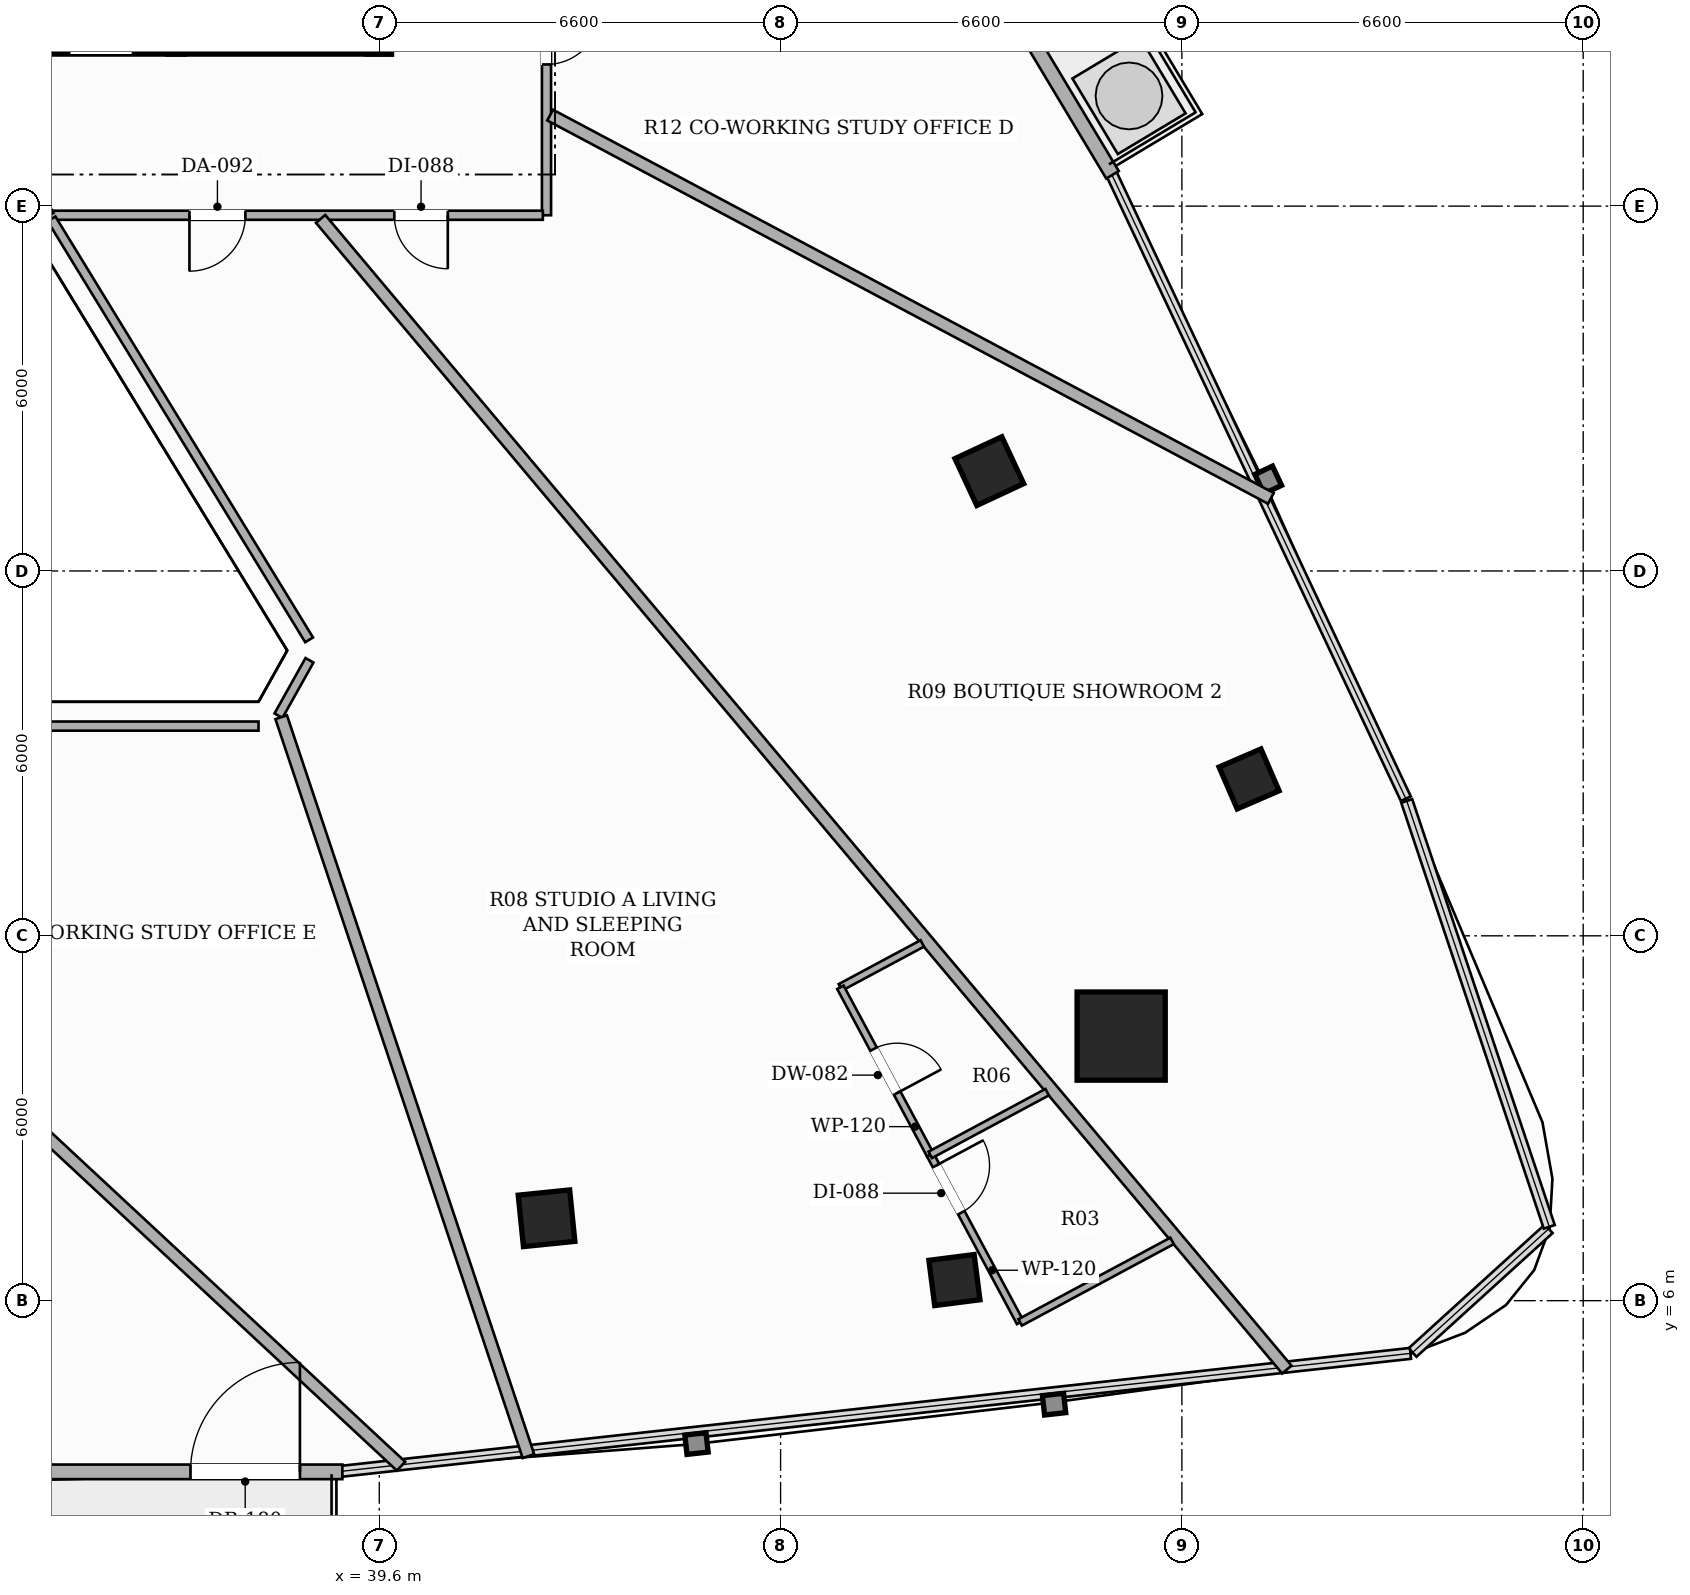
"""IFC4 building model, lengths in metres.
Left out: names, types, materials, properties, quantities, classifications, styles, units other than length and angle.
Written with IfcOpenShell. Run it as: python <this file> out.ifc"""

import sys

from ifc_helpers import new_model, si_unit, direction, frame, frame_2d, origin, origin_2d, place, context, subcontext, project, spatial, rectangle, hollow_rectangle, extrude, element, fill, save


model = new_model("IFC4")
c1 = context("Model", 3, precision=1e-05, world=origin(), true_north=direction((0.0, 1.0)))
c2 = subcontext(c1, "Body", "Model", "MODEL_VIEW")
j1 = project(units=[si_unit("LENGTHUNIT", "METRE"), si_unit("PLANEANGLEUNIT", "RADIAN")], contexts=[c1])
p1 = place(None, origin())
s1 = spatial("IfcSite", under=j1, at=p1, CompositionType="ELEMENT")
p2 = place(p1, origin())
s2 = spatial("IfcBuilding", under=s1, at=p2, CompositionType="ELEMENT")
p3 = place(p2, frame((0.0, 0.0, 133.1)))
s3 = spatial("IfcBuildingStorey", under=s2, at=p3, CompositionType="ELEMENT", Elevation=133.1)
p4 = place(p3, frame((26.2, 26.7, 0.0), z_axis=(0.0, 0.0, 1.0), x_axis=(1.0, 0.0, 0.0)))
e1 = element("IfcWall", 1, at=p4, inside=s3, PredefinedType="SHEAR", context=c2, shape_type="SweptSolid", body=[
    extrude(rectangle(XDim=13.6, YDim=0.4, at=frame_2d((6.8, 0.0))), origin(), (0.0, 0.0, 1.0), 3.3),
])
p5 = place(p4, frame((4.35, 0.0, 0.0)))
e2 = element("IfcOpeningElement", 2, at=p5, cuts=e1, PredefinedType="OPENING", context=c2, shape_type="SweptSolid", body=[
    extrude(rectangle(XDim=1.05, YDim=2.15, at=frame_2d((0.525, 1.075))), frame((0.0, 0.21, 0.0), z_axis=(0.0, -1.0, 0.0), x_axis=(1.0, 0.0, 0.0)), (0.0, 0.0, 1.0), 0.42),
])
p6 = place(p4, frame((8.3, 0.0, 0.0)))
e3 = element("IfcOpeningElement", 3, at=p6, cuts=e1, PredefinedType="OPENING", context=c2, shape_type="SweptSolid", body=[
    extrude(rectangle(XDim=1.05, YDim=2.15, at=frame_2d((0.525, 1.075))), frame((0.0, 0.21, 0.0), z_axis=(0.0, -1.0, 0.0), x_axis=(1.0, 0.0, 0.0)), (0.0, 0.0, 1.0), 0.42),
])
p7 = place(p3, frame((39.6, 26.5, 0.0), z_axis=(0.0, 0.0, 1.0), x_axis=(0.0, 1.0, 0.0)))
e4 = element("IfcWall", 4, at=p7, inside=s3, PredefinedType="SHEAR", context=c2, shape_type="SweptSolid", body=[
    extrude(rectangle(XDim=7.6, YDim=0.4, at=frame_2d((3.8, 0.0))), origin(), (0.0, 0.0, 1.0), 3.3),
])
p8 = place(p3, frame((36.26, 26.5, 0.0), z_axis=(0.0, 0.0, 1.0), x_axis=(0.0, 1.0, 0.0)))
e5 = element("IfcWall", 5, at=p8, inside=s3, PredefinedType="SHEAR", context=c2, shape_type="SweptSolid", body=[
    extrude(rectangle(XDim=8.15, YDim=0.28, at=frame_2d((4.075, 0.0))), origin(), (0.0, 0.0, 1.0), 3.3),
])
p9 = place(p8, frame((0.6, 0.0, 0.0)))
e6 = element("IfcOpeningElement", 6, at=p9, cuts=e5, PredefinedType="OPENING", context=c2, shape_type="SweptSolid", body=[
    extrude(rectangle(XDim=1.05, YDim=2.15, at=frame_2d((0.525, 1.075))), frame((0.0, 0.15, 0.0), z_axis=(0.0, -1.0, 0.0), x_axis=(1.0, 0.0, 0.0)), (0.0, 0.0, 1.0), 0.3),
])
p10 = place(p3, frame((51.801, 10.351, 0.0), z_axis=(0.0, 0.0, 1.0), x_axis=(1.0, 0.0, 0.0)))
e7 = element("IfcColumn", 7, at=p10, inside=s3, PredefinedType="COLUMN", context=c2, shape_type="SweptSolid", body=[
    extrude(hollow_rectangle(XDim=1.45, YDim=1.45, WallThickness=0.045, at=origin_2d()), origin(), (0.0, 0.0, 1.0), 3.3),
])
for number, where, z_axis, x_axis in (
    (8, (42.351, 7.355, 0.0), (0.0, 0.0, 1.0), (0.995, 0.101, 0.0)),
    (9, (49.633, 19.642, 0.0), (0.0, 0.0, 1.0), (-0.423, 0.906, 0.0)),
):
    element("IfcColumn", number, at=place(p3, frame(where, z_axis=z_axis, x_axis=x_axis)), inside=s3, PredefinedType="COLUMN", context=c2, shape_type="SweptSolid", body=[
        extrude(hollow_rectangle(XDim=0.85, YDim=0.85, WallThickness=0.028, at=origin_2d()), origin(), (0.0, 0.0, 1.0), 3.3),
    ])
for number, where, z_axis, x_axis in (
    (10, (49.059, 6.339, 0.0), (0.0, 0.0, 1.0), (0.992, 0.127, 0.0)),
    (11, (53.905, 14.58, 0.0), (0.0, 0.0, 1.0), (-0.397, 0.918, 0.0)),
):
    element("IfcColumn", number, at=place(p3, frame(where, z_axis=z_axis, x_axis=x_axis)), inside=s3, PredefinedType="COLUMN", context=c2, shape_type="SweptSolid", body=[
        extrude(hollow_rectangle(XDim=0.75, YDim=0.75, WallThickness=0.025, at=origin_2d()), origin(), (0.0, 0.0, 1.0), 3.3),
    ])
p11 = place(p3, frame((27.007, 3.185, 0.0), z_axis=(0.0, 0.0, 1.0), x_axis=(1.0, 0.0, 0.0)))
e12 = element("IfcWall", 12, at=p11, inside=s3, PredefinedType="SOLIDWALL", context=c2, shape_type="SweptSolid", body=[
    extrude(rectangle(XDim=11.986, YDim=0.24, at=frame_2d((5.993, 0.0))), origin(), (0.0, 0.0, 1.0), 2.624),
])
p12 = place(p11, frame((9.488, 0.0, 0.0)))
e13 = element("IfcOpeningElement", 13, at=p12, cuts=e12, PredefinedType="OPENING", context=c2, shape_type="SweptSolid", body=[
    extrude(rectangle(XDim=1.8, YDim=2.2, at=frame_2d((0.9, 1.1))), frame((0.0, 0.13, 0.0), z_axis=(0.0, -1.0, 0.0), x_axis=(1.0, 0.0, 0.0)), (0.0, 0.0, 1.0), 0.26),
])
p13 = place(p3, frame((51.659, 24.515, 0.0), z_axis=(0.0, 0.0, 1.0), x_axis=(-0.514343998995, 0.857583961311, 0.0)))
e14 = element("IfcWall", 14, at=p13, inside=s3, PredefinedType="SOLIDWALL", context=c2, shape_type="SweptSolid", body=[
    extrude(rectangle(XDim=11.593, YDim=0.24, at=frame_2d((5.797, 0.0))), origin(), (0.0, 0.0, 1.0), 2.624),
])
p14 = place(p13, frame((9.096, 0.0, 0.0)))
e15 = element("IfcOpeningElement", 15, at=p14, cuts=e14, PredefinedType="OPENING", context=c2, shape_type="SweptSolid", body=[
    extrude(rectangle(XDim=1.8, YDim=2.2, at=frame_2d((0.9, 1.1))), frame((0.0, 0.13, 0.0), z_axis=(0.0, -1.0, 0.0), x_axis=(1.0, 0.0, 0.0)), (0.0, 0.0, 1.0), 0.26),
])
p15 = place(p3, frame((42.35, 28.34, 0.0), z_axis=(0.0, 0.0, 1.0), x_axis=(0.0, -1.0, 0.0)))
e16 = element("IfcWall", 16, at=p15, inside=s3, PredefinedType="PARTITIONING", context=c2, shape_type="SweptSolid", body=[
    extrude(rectangle(XDim=4.49, YDim=0.15, at=frame_2d((2.245, 0.0))), origin(), (0.0, 0.0, 1.0), 2.721),
])
p16 = place(p15, frame((1.13, 0.0, 0.0)))
e17 = element("IfcOpeningElement", 17, at=p16, cuts=e16, PredefinedType="OPENING", context=c2, shape_type="SweptSolid", body=[
    extrude(rectangle(XDim=0.88, YDim=2.1, at=frame_2d((0.44, 1.05))), frame((0.0, 0.085, 0.0), z_axis=(0.0, -1.0, 0.0), x_axis=(1.0, 0.0, 0.0)), (0.0, 0.0, 1.0), 0.17),
])
p17 = place(p3, frame((42.29, 23.85, 0.0), z_axis=(0.0, 0.0, 1.0), x_axis=(-1.0, 0.0, 0.0)))
e18 = element("IfcWall", 18, at=p17, inside=s3, PredefinedType="PARTITIONING", context=c2, shape_type="SweptSolid", body=[
    extrude(rectangle(XDim=8.111, YDim=0.15, at=frame_2d((4.056, 0.0))), origin(), (0.0, 0.0, 1.0), 2.492),
])
p18 = place(p17, frame((1.563, 0.0, 0.0)))
e19 = element("IfcOpeningElement", 19, at=p18, cuts=e18, PredefinedType="OPENING", context=c2, shape_type="SweptSolid", body=[
    extrude(rectangle(XDim=0.88, YDim=2.1, at=frame_2d((0.44, 1.05))), frame((0.0, 0.085, 0.0), z_axis=(0.0, -1.0, 0.0), x_axis=(1.0, 0.0, 0.0)), (0.0, 0.0, 1.0), 0.17),
])
p19 = place(p17, frame((4.892, 0.0, 0.0)))
e20 = element("IfcOpeningElement", 20, at=p19, cuts=e18, PredefinedType="OPENING", context=c2, shape_type="SweptSolid", body=[
    extrude(rectangle(XDim=0.92, YDim=2.15, at=frame_2d((0.46, 1.075))), frame((0.0, 0.085, 0.0), z_axis=(0.0, -1.0, 0.0), x_axis=(1.0, 0.0, 0.0)), (0.0, 0.0, 1.0), 0.17),
])
p20 = place(p3, frame((34.179, 23.85, 0.0), z_axis=(0.0, 0.0, 1.0), x_axis=(-0.527828834635, 0.849350764601, 0.0)))
e21 = element("IfcWall", 21, at=p20, inside=s3, PredefinedType="PARTITIONING", context=c2, shape_type="SweptSolid", body=[
    extrude(rectangle(XDim=0.678, YDim=0.15, at=frame_2d((0.339, 0.0))), origin(), (0.0, 0.0, 1.0), 3.06),
])
p21 = place(p3, frame((34.21, 23.79, 0.0), z_axis=(0.0, 0.0, 1.0), x_axis=(0.521925672495, -0.852990968528, 0.0)))
e22 = element("IfcWall", 22, at=p21, inside=s3, PredefinedType="PARTITIONING", context=c2, shape_type="SweptSolid", body=[
    extrude(rectangle(XDim=8.116, YDim=0.15, at=frame_2d((4.058, 0.0))), origin(), (0.0, 0.0, 1.0), 2.721),
])
p22 = place(p3, frame((38.452, 16.531, 0.0), z_axis=(0.0, 0.0, 1.0), x_axis=(-0.488539276118, -0.872541904833, 0.0)))
e23 = element("IfcWall", 23, at=p22, inside=s3, PredefinedType="PARTITIONING", context=c2, shape_type="SweptSolid", body=[
    extrude(rectangle(XDim=1.044, YDim=0.15, at=frame_2d((0.522, 0.0))), origin(), (0.0, 0.0, 1.0), 3.06),
])
p23 = place(p3, frame((37.614, 15.449, 0.0), z_axis=(0.0, 0.0, 1.0), x_axis=(-1.0, 0.0, 0.0)))
e24 = element("IfcWall", 24, at=p23, inside=s3, PredefinedType="PARTITIONING", context=c2, shape_type="SweptSolid", body=[
    extrude(rectangle(XDim=9.228, YDim=0.15, at=frame_2d((4.614, 0.0))), origin(), (0.0, 0.0, 1.0), 2.721),
])
p24 = place(p3, frame((54.526, 4.867, 0.0), z_axis=(0.0, 0.0, 1.0), x_axis=(-0.643084567011, 0.765795168222, 0.0)))
e25 = element("IfcWall", 25, at=p24, inside=s3, PredefinedType="PARTITIONING", context=c2, shape_type="SweptSolid", body=[
    extrude(rectangle(XDim=24.71, YDim=0.2, at=frame_2d((12.355, 0.0))), origin(), (0.0, 0.0, 1.0), 2.413),
])
p25 = place(p3, frame((42.41, 25.497, 0.0), z_axis=(0.0, 0.0, 1.0), x_axis=(0.882944726502, -0.46947695358, 0.0)))
e26 = element("IfcWall", 26, at=p25, inside=s3, PredefinedType="PARTITIONING", context=c2, shape_type="SweptSolid", body=[
    extrude(rectangle(XDim=13.426, YDim=0.2, at=frame_2d((6.713, 0.0))), origin(), (0.0, 0.0, 1.0), 2.413),
])
p26 = place(p3, frame((42.053, 3.444, 0.0), z_axis=(0.0, 0.0, 1.0), x_axis=(-0.317325063931, 0.948316826699, 0.0)))
e27 = element("IfcWall", 27, at=p26, inside=s3, PredefinedType="PARTITIONING", context=c2, shape_type="SweptSolid", body=[
    extrude(rectangle(XDim=12.813, YDim=0.2, at=frame_2d((6.406, 0.0))), origin(), (0.0, 0.0, 1.0), 2.413),
])
p27 = place(p3, frame((39.958, 3.278, 0.0), z_axis=(0.0, 0.0, 1.0), x_axis=(-0.732155976475, 0.681137009795, 0.0)))
e28 = element("IfcWall", 28, at=p27, inside=s3, PredefinedType="PARTITIONING", context=c2, shape_type="SweptSolid", body=[
    extrude(rectangle(XDim=18.778, YDim=0.2, at=frame_2d((9.389, 0.0))), origin(), (0.0, 0.0, 1.0), 2.413),
])
p28 = place(p3, frame((48.53, 11.875, 0.0), z_axis=(0.0, 0.0, 1.0), x_axis=(-0.881239847135, -0.472669368398, 0.0)))
e29 = element("IfcWall", 29, at=p28, inside=s3, PredefinedType="PARTITIONING", context=c2, shape_type="SweptSolid", body=[
    extrude(rectangle(XDim=1.527, YDim=0.12, at=frame_2d((0.764, 0.0))), origin(), (0.0, 0.0, 1.0), 3.06),
])
p29 = place(p3, frame((47.184, 11.153, 0.0), z_axis=(0.0, 0.0, 1.0), x_axis=(0.472734891499, -0.881204699465, 0.0)))
e30 = element("IfcWall", 30, at=p29, inside=s3, PredefinedType="PARTITIONING", context=c2, shape_type="SweptSolid", body=[
    extrude(rectangle(XDim=3.126, YDim=0.12, at=frame_2d((1.563, 0.0))), origin(), (0.0, 0.0, 1.0), 2.721),
])
p30 = place(p29, frame((1.153, 0.0, 0.0)))
e31 = element("IfcOpeningElement", 31, at=p30, cuts=e30, PredefinedType="OPENING", context=c2, shape_type="SweptSolid", body=[
    extrude(rectangle(XDim=0.82, YDim=2.1, at=frame_2d((0.41, 1.05))), frame((0.0, 0.07, 0.0), z_axis=(0.0, -1.0, 0.0), x_axis=(1.0, 0.0, 0.0)), (0.0, 0.0, 1.0), 0.14),
])
p31 = place(p3, frame((48.662, 8.398, 0.0), z_axis=(0.0, 0.0, 1.0), x_axis=(0.472706781447, -0.881219778928, 0.0)))
e32 = element("IfcWall", 32, at=p31, inside=s3, PredefinedType="PARTITIONING", context=c2, shape_type="SweptSolid", body=[
    extrude(rectangle(XDim=3.126, YDim=0.12, at=frame_2d((1.563, 0.0))), origin(), (0.0, 0.0, 1.0), 2.413),
])
p32 = place(p31, frame((0.2, 0.0, 0.0)))
e33 = element("IfcOpeningElement", 33, at=p32, cuts=e32, PredefinedType="OPENING", context=c2, shape_type="SweptSolid", body=[
    extrude(rectangle(XDim=0.88, YDim=2.1, at=frame_2d((0.44, 1.05))), frame((0.0, 0.07, 0.0), z_axis=(0.0, -1.0, 0.0), x_axis=(1.0, 0.0, 0.0)), (0.0, 0.0, 1.0), 0.14),
])
p33 = place(p3, frame((50.14, 5.643, 0.0), z_axis=(0.0, 0.0, 1.0), x_axis=(0.881244272045, 0.472661118548, 0.0)))
e34 = element("IfcWall", 34, at=p33, inside=s3, PredefinedType="PARTITIONING", context=c2, shape_type="SweptSolid", body=[
    extrude(rectangle(XDim=2.835, YDim=0.12, at=frame_2d((1.417, 0.0))), origin(), (0.0, 0.0, 1.0), 2.619),
])
p34 = place(p3, frame((50.584, 9.429, 0.0), z_axis=(0.0, 0.0, 1.0), x_axis=(-0.88120690194, -0.472730785937, 0.0)))
e35 = element("IfcWall", 35, at=p34, inside=s3, PredefinedType="PARTITIONING", context=c2, shape_type="SweptSolid", body=[
    extrude(rectangle(XDim=2.181, YDim=0.12, at=frame_2d((1.09, 0.0))), origin(), (0.0, 0.0, 1.0), 3.06),
])
p35 = place(p12, origin())
e36 = element("IfcDoor", 36, at=p35, inside=s3, OperationType="SINGLE_SWING_RIGHT", PredefinedType="DOOR", context=c2, shape_type="SweptSolid", body=[
    extrude(rectangle(XDim=1.8, YDim=2.2, at=frame_2d((0.9, 1.1))), frame((0.0, 0.025, 0.0), z_axis=(0.0, -1.0, 0.0), x_axis=(1.0, 0.0, 0.0)), (0.0, 0.0, 1.0), 0.05),
])
fill(e13, e36)
p36 = place(p18, origin())
e37 = element("IfcDoor", 37, at=p36, inside=s3, OperationType="SINGLE_SWING_LEFT", PredefinedType="DOOR", context=c2, shape_type="SweptSolid", body=[
    extrude(rectangle(XDim=0.88, YDim=2.1, at=frame_2d((0.44, 1.05))), frame((0.0, 0.025, 0.0), z_axis=(0.0, -1.0, 0.0), x_axis=(1.0, 0.0, 0.0)), (0.0, 0.0, 1.0), 0.05),
])
fill(e19, e37)
p37 = place(p19, origin())
e38 = element("IfcDoor", 38, at=p37, inside=s3, OperationType="SINGLE_SWING_RIGHT", PredefinedType="DOOR", context=c2, shape_type="SweptSolid", body=[
    extrude(rectangle(XDim=0.92, YDim=2.15, at=frame_2d((0.46, 1.075))), frame((0.0, 0.025, 0.0), z_axis=(0.0, -1.0, 0.0), x_axis=(1.0, 0.0, 0.0)), (0.0, 0.0, 1.0), 0.05),
])
fill(e20, e38)
p38 = place(p30, origin())
e39 = element("IfcDoor", 39, at=p38, inside=s3, OperationType="SINGLE_SWING_RIGHT", PredefinedType="DOOR", context=c2, shape_type="SweptSolid", body=[
    extrude(rectangle(XDim=0.82, YDim=2.1, at=frame_2d((0.41, 1.05))), frame((0.0, 0.025, 0.0), z_axis=(0.0, -1.0, 0.0), x_axis=(1.0, 0.0, 0.0)), (0.0, 0.0, 1.0), 0.05),
])
fill(e31, e39)
p39 = place(p32, origin())
e40 = element("IfcDoor", 40, at=p39, inside=s3, OperationType="SINGLE_SWING_LEFT", PredefinedType="DOOR", context=c2, shape_type="SweptSolid", body=[
    extrude(rectangle(XDim=0.88, YDim=2.1, at=frame_2d((0.44, 1.05))), frame((0.0, 0.025, 0.0), z_axis=(0.0, -1.0, 0.0), x_axis=(1.0, 0.0, 0.0)), (0.0, 0.0, 1.0), 0.05),
])
fill(e33, e40)
p40 = place(p16, origin())
e41 = element("IfcDoor", 41, at=p40, inside=s3, OperationType="SINGLE_SWING_LEFT", PredefinedType="DOOR", context=c2, shape_type="SweptSolid", body=[
    extrude(rectangle(XDim=0.88, YDim=2.1, at=frame_2d((0.44, 1.05))), frame((0.0, 0.025, 0.0), z_axis=(0.0, -1.0, 0.0), x_axis=(1.0, 0.0, 0.0)), (0.0, 0.0, 1.0), 0.05),
])
fill(e17, e41)
save(model, sys.argv[1])
